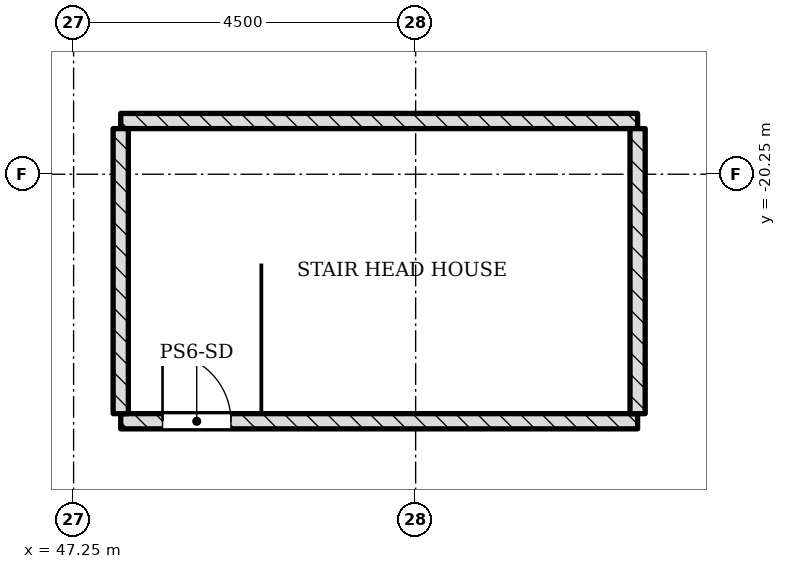
"""IFC4 building model, lengths in metres.
Left out: names, types, materials, properties, quantities, classifications, styles, units other than length and angle.
Written with IfcOpenShell. Run it as: python <this file> out.ifc"""

import sys

from ifc_helpers import new_model, si_unit, direction, frame, frame_2d, origin, place, context, subcontext, project, spatial, rectangle, extrude, element, fill, save


model = new_model("IFC4")
c1 = context("Model", 3, precision=1e-05, world=origin(), true_north=direction((0.0, 1.0)))
c2 = subcontext(c1, "Body", "Model", "MODEL_VIEW")
j1 = project(units=[si_unit("LENGTHUNIT", "METRE"), si_unit("PLANEANGLEUNIT", "RADIAN")], contexts=[c1])
p1 = place(None, origin())
s1 = spatial("IfcSite", under=j1, at=p1, CompositionType="ELEMENT")
p2 = place(p1, origin())
s2 = spatial("IfcBuilding", under=s1, at=p2, CompositionType="ELEMENT")
p3 = place(p2, frame((0.0, 0.0, 24.5)))
s3 = spatial("IfcBuildingStorey", under=s2, at=p3, CompositionType="ELEMENT", Elevation=24.5)
p4 = place(p3, frame((47.87, -23.5, 0.0), z_axis=(0.0, 0.0, 1.0), x_axis=(1.0, 0.0, 0.0)))
e1 = element("IfcWall", 1, at=p4, inside=s3, PredefinedType="SHEAR", context=c2, shape_type="SweptSolid", body=[
    extrude(rectangle(XDim=6.8, YDim=0.2, at=frame_2d((3.4, 0.0))), origin(), (0.0, 0.0, 1.0), 3.0),
])
p5 = place(p4, frame((0.55, 0.0, 0.0)))
e2 = element("IfcOpeningElement", 2, at=p5, cuts=e1, PredefinedType="OPENING", context=c2, shape_type="SweptSolid", body=[
    extrude(rectangle(XDim=0.9, YDim=2.1, at=frame_2d((0.45, 1.05))), frame((0.0, 0.11, 0.0), z_axis=(0.0, -1.0, 0.0), x_axis=(1.0, 0.0, 0.0)), (0.0, 0.0, 1.0), 0.22),
])
p6 = place(p3, frame((47.87, -19.55, 0.0), z_axis=(0.0, 0.0, 1.0), x_axis=(1.0, 0.0, 0.0)))
e3 = element("IfcWall", 3, at=p6, inside=s3, PredefinedType="SHEAR", context=c2, shape_type="SweptSolid", body=[
    extrude(rectangle(XDim=6.8, YDim=0.2, at=frame_2d((3.4, 0.0))), origin(), (0.0, 0.0, 1.0), 3.0),
])
for number, where, z_axis, x_axis in (
    (4, (47.87, -23.4, 0.0), (0.0, 0.0, 1.0), (0.0, 1.0, 0.0)),
    (5, (54.67, -23.4, 0.0), (0.0, 0.0, 1.0), (0.0, 1.0, 0.0)),
):
    element("IfcWall", number, at=place(p3, frame(where, z_axis=z_axis, x_axis=x_axis)), inside=s3, PredefinedType="SHEAR", context=c2, shape_type="SweptSolid", body=[
        extrude(rectangle(XDim=3.75, YDim=0.2, at=frame_2d((1.875, 0.0))), origin(), (0.0, 0.0, 1.0), 3.0),
    ])
p7 = place(p5, origin())
e6 = element("IfcDoor", 6, at=p7, inside=s3, OperationType="SINGLE_SWING_RIGHT", PredefinedType="DOOR", context=c2, shape_type="SweptSolid", body=[
    extrude(rectangle(XDim=0.9, YDim=2.1, at=frame_2d((0.45, 1.05))), frame((0.0, 0.025, 0.0), z_axis=(0.0, -1.0, 0.0), x_axis=(1.0, 0.0, 0.0)), (0.0, 0.0, 1.0), 0.05),
])
fill(e2, e6)
save(model, sys.argv[1])
